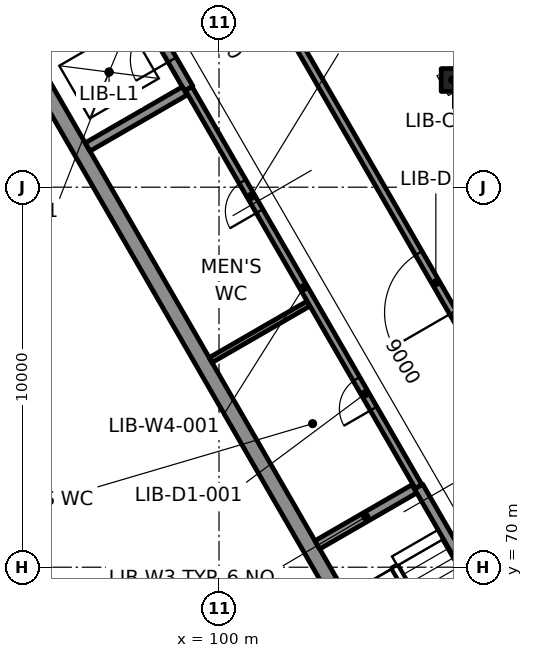
"""IFC4 building model, lengths in metres.
Left out: names, types, materials, properties, quantities, classifications, styles, units other than length and angle.
Written with IfcOpenShell. Run it as: python <this file> out.ifc"""

import sys

from ifc_helpers import new_model, si_unit, direction, frame, frame_2d, origin, origin_2d, place, context, subcontext, project, spatial, rectangle, extrude, element, fill, save


model = new_model("IFC4")
c1 = context("Model", 3, precision=1e-05, world=origin(), true_north=direction((0.0, 1.0)))
c2 = subcontext(c1, "Body", "Model", "MODEL_VIEW")
j1 = project(units=[si_unit("LENGTHUNIT", "METRE"), si_unit("PLANEANGLEUNIT", "RADIAN")], contexts=[c1])
p1 = place(None, origin())
s1 = spatial("IfcSite", under=j1, at=p1, CompositionType="ELEMENT")
p2 = place(p1, origin())
s2 = spatial("IfcBuilding", under=s1, at=p2, CompositionType="ELEMENT")
p3 = place(p2, origin())
s3 = spatial("IfcBuildingStorey", under=s2, at=p3, CompositionType="ELEMENT", Elevation=0.0)
p4 = place(p3, frame((97.021, 76.628, 0.0), z_axis=(0.0, 0.0, 1.0), x_axis=(-0.5, 0.866025403784, 0.0)))
e1 = element("IfcColumn", 1, at=p4, inside=s3, PredefinedType="COLUMN", context=c2, shape_type="SweptSolid", body=[
    extrude(rectangle(XDim=1.2, YDim=1.5, at=origin_2d()), origin(), (0.0, 0.0, 1.0), 8.0),
])
p5 = place(p3, frame((107.504, 60.451, 0.0), z_axis=(0.0, 0.0, 1.0), x_axis=(-0.500000550228, 0.86602508611, 0.0)))
e2 = element("IfcWall", 2, at=p5, inside=s3, PredefinedType="SOLIDWALL", context=c2, shape_type="SweptSolid", body=[
    extrude(rectangle(XDim=57.704, YDim=0.3, at=frame_2d((28.852, 0.0))), origin(), (0.0, 0.0, 1.0), 7.7),
])
p6 = place(p5, frame((56.104, 0.0, 0.0)))
e3 = element("IfcOpeningElement", 3, at=p6, cuts=e2, PredefinedType="OPENING", context=c2, shape_type="SweptSolid", body=[
    extrude(rectangle(XDim=1.2, YDim=2.4, at=frame_2d((0.6, 1.2))), frame((0.0, 0.16, 0.0), z_axis=(0.0, -1.0, 0.0), x_axis=(1.0, 0.0, 0.0)), (0.0, 0.0, 1.0), 0.32),
])
p7 = place(p5, frame((1.552, 0.0, 0.15)))
e4 = element("IfcOpeningElement", 4, at=p7, cuts=e2, PredefinedType="OPENING", context=c2, shape_type="SweptSolid", body=[
    extrude(rectangle(XDim=2.1, YDim=5.4, at=frame_2d((1.05, 2.7))), frame((0.0, 0.16, 0.0), z_axis=(0.0, -1.0, 0.0), x_axis=(1.0, 0.0, 0.0)), (0.0, 0.0, 1.0), 0.32),
])
p8 = place(p5, frame((4.052, 0.0, 0.15)))
e5 = element("IfcOpeningElement", 5, at=p8, cuts=e2, PredefinedType="OPENING", context=c2, shape_type="SweptSolid", body=[
    extrude(rectangle(XDim=2.1, YDim=5.4, at=frame_2d((1.05, 2.7))), frame((0.0, 0.16, 0.0), z_axis=(0.0, -1.0, 0.0), x_axis=(1.0, 0.0, 0.0)), (0.0, 0.0, 1.0), 0.32),
])
p9 = place(p5, frame((6.552, 0.0, 0.15)))
e6 = element("IfcOpeningElement", 6, at=p9, cuts=e2, PredefinedType="OPENING", context=c2, shape_type="SweptSolid", body=[
    extrude(rectangle(XDim=2.1, YDim=5.4, at=frame_2d((1.05, 2.7))), frame((0.0, 0.16, 0.0), z_axis=(0.0, -1.0, 0.0), x_axis=(1.0, 0.0, 0.0)), (0.0, 0.0, 1.0), 0.32),
])
p10 = place(p5, frame((9.052, 0.0, 0.15)))
e7 = element("IfcOpeningElement", 7, at=p10, cuts=e2, PredefinedType="OPENING", context=c2, shape_type="SweptSolid", body=[
    extrude(rectangle(XDim=2.1, YDim=5.4, at=frame_2d((1.05, 2.7))), frame((0.0, 0.16, 0.0), z_axis=(0.0, -1.0, 0.0), x_axis=(1.0, 0.0, 0.0)), (0.0, 0.0, 1.0), 0.32),
])
p11 = place(p5, frame((11.552, 0.0, 0.15)))
e8 = element("IfcOpeningElement", 8, at=p11, cuts=e2, PredefinedType="OPENING", context=c2, shape_type="SweptSolid", body=[
    extrude(rectangle(XDim=2.1, YDim=5.4, at=frame_2d((1.05, 2.7))), frame((0.0, 0.16, 0.0), z_axis=(0.0, -1.0, 0.0), x_axis=(1.0, 0.0, 0.0)), (0.0, 0.0, 1.0), 0.32),
])
p12 = place(p5, frame((14.052, 0.0, 0.15)))
e9 = element("IfcOpeningElement", 9, at=p12, cuts=e2, PredefinedType="OPENING", context=c2, shape_type="SweptSolid", body=[
    extrude(rectangle(XDim=2.1, YDim=5.4, at=frame_2d((1.05, 2.7))), frame((0.0, 0.16, 0.0), z_axis=(0.0, -1.0, 0.0), x_axis=(1.0, 0.0, 0.0)), (0.0, 0.0, 1.0), 0.32),
])
p13 = place(p5, frame((16.552, 0.0, 0.15)))
e10 = element("IfcOpeningElement", 10, at=p13, cuts=e2, PredefinedType="OPENING", context=c2, shape_type="SweptSolid", body=[
    extrude(rectangle(XDim=2.1, YDim=5.4, at=frame_2d((1.05, 2.7))), frame((0.0, 0.16, 0.0), z_axis=(0.0, -1.0, 0.0), x_axis=(1.0, 0.0, 0.0)), (0.0, 0.0, 1.0), 0.32),
])
p14 = place(p5, frame((19.052, 0.0, 0.15)))
e11 = element("IfcOpeningElement", 11, at=p14, cuts=e2, PredefinedType="OPENING", context=c2, shape_type="SweptSolid", body=[
    extrude(rectangle(XDim=2.1, YDim=5.4, at=frame_2d((1.05, 2.7))), frame((0.0, 0.16, 0.0), z_axis=(0.0, -1.0, 0.0), x_axis=(1.0, 0.0, 0.0)), (0.0, 0.0, 1.0), 0.32),
])
p15 = place(p5, frame((21.552, 0.0, 0.15)))
e12 = element("IfcOpeningElement", 12, at=p15, cuts=e2, PredefinedType="OPENING", context=c2, shape_type="SweptSolid", body=[
    extrude(rectangle(XDim=2.1, YDim=5.4, at=frame_2d((1.05, 2.7))), frame((0.0, 0.16, 0.0), z_axis=(0.0, -1.0, 0.0), x_axis=(1.0, 0.0, 0.0)), (0.0, 0.0, 1.0), 0.32),
])
p16 = place(p5, frame((24.052, 0.0, 0.15)))
e13 = element("IfcOpeningElement", 13, at=p16, cuts=e2, PredefinedType="OPENING", context=c2, shape_type="SweptSolid", body=[
    extrude(rectangle(XDim=2.1, YDim=5.4, at=frame_2d((1.05, 2.7))), frame((0.0, 0.16, 0.0), z_axis=(0.0, -1.0, 0.0), x_axis=(1.0, 0.0, 0.0)), (0.0, 0.0, 1.0), 0.32),
])
p17 = place(p5, frame((26.552, 0.0, 0.15)))
e14 = element("IfcOpeningElement", 14, at=p17, cuts=e2, PredefinedType="OPENING", context=c2, shape_type="SweptSolid", body=[
    extrude(rectangle(XDim=2.1, YDim=5.4, at=frame_2d((1.05, 2.7))), frame((0.0, 0.16, 0.0), z_axis=(0.0, -1.0, 0.0), x_axis=(1.0, 0.0, 0.0)), (0.0, 0.0, 1.0), 0.32),
])
p18 = place(p5, frame((29.052, 0.0, 0.15)))
e15 = element("IfcOpeningElement", 15, at=p18, cuts=e2, PredefinedType="OPENING", context=c2, shape_type="SweptSolid", body=[
    extrude(rectangle(XDim=2.1, YDim=5.4, at=frame_2d((1.05, 2.7))), frame((0.0, 0.16, 0.0), z_axis=(0.0, -1.0, 0.0), x_axis=(1.0, 0.0, 0.0)), (0.0, 0.0, 1.0), 0.32),
])
p19 = place(p5, frame((31.552, 0.0, 0.15)))
e16 = element("IfcOpeningElement", 16, at=p19, cuts=e2, PredefinedType="OPENING", context=c2, shape_type="SweptSolid", body=[
    extrude(rectangle(XDim=2.1, YDim=5.4, at=frame_2d((1.05, 2.7))), frame((0.0, 0.16, 0.0), z_axis=(0.0, -1.0, 0.0), x_axis=(1.0, 0.0, 0.0)), (0.0, 0.0, 1.0), 0.32),
])
p20 = place(p5, frame((34.052, 0.0, 0.15)))
e17 = element("IfcOpeningElement", 17, at=p20, cuts=e2, PredefinedType="OPENING", context=c2, shape_type="SweptSolid", body=[
    extrude(rectangle(XDim=2.1, YDim=5.4, at=frame_2d((1.05, 2.7))), frame((0.0, 0.16, 0.0), z_axis=(0.0, -1.0, 0.0), x_axis=(1.0, 0.0, 0.0)), (0.0, 0.0, 1.0), 0.32),
])
p21 = place(p5, frame((36.552, 0.0, 0.15)))
e18 = element("IfcOpeningElement", 18, at=p21, cuts=e2, PredefinedType="OPENING", context=c2, shape_type="SweptSolid", body=[
    extrude(rectangle(XDim=2.1, YDim=5.4, at=frame_2d((1.05, 2.7))), frame((0.0, 0.16, 0.0), z_axis=(0.0, -1.0, 0.0), x_axis=(1.0, 0.0, 0.0)), (0.0, 0.0, 1.0), 0.32),
])
p22 = place(p5, frame((39.052, 0.0, 0.15)))
e19 = element("IfcOpeningElement", 19, at=p22, cuts=e2, PredefinedType="OPENING", context=c2, shape_type="SweptSolid", body=[
    extrude(rectangle(XDim=2.1, YDim=5.4, at=frame_2d((1.05, 2.7))), frame((0.0, 0.16, 0.0), z_axis=(0.0, -1.0, 0.0), x_axis=(1.0, 0.0, 0.0)), (0.0, 0.0, 1.0), 0.32),
])
p23 = place(p5, frame((41.552, 0.0, 0.15)))
e20 = element("IfcOpeningElement", 20, at=p23, cuts=e2, PredefinedType="OPENING", context=c2, shape_type="SweptSolid", body=[
    extrude(rectangle(XDim=2.1, YDim=5.4, at=frame_2d((1.05, 2.7))), frame((0.0, 0.16, 0.0), z_axis=(0.0, -1.0, 0.0), x_axis=(1.0, 0.0, 0.0)), (0.0, 0.0, 1.0), 0.32),
])
p24 = place(p5, frame((44.052, 0.0, 0.15)))
e21 = element("IfcOpeningElement", 21, at=p24, cuts=e2, PredefinedType="OPENING", context=c2, shape_type="SweptSolid", body=[
    extrude(rectangle(XDim=2.1, YDim=5.4, at=frame_2d((1.05, 2.7))), frame((0.0, 0.16, 0.0), z_axis=(0.0, -1.0, 0.0), x_axis=(1.0, 0.0, 0.0)), (0.0, 0.0, 1.0), 0.32),
])
p25 = place(p5, frame((46.552, 0.0, 0.15)))
e22 = element("IfcOpeningElement", 22, at=p25, cuts=e2, PredefinedType="OPENING", context=c2, shape_type="SweptSolid", body=[
    extrude(rectangle(XDim=2.1, YDim=5.4, at=frame_2d((1.05, 2.7))), frame((0.0, 0.16, 0.0), z_axis=(0.0, -1.0, 0.0), x_axis=(1.0, 0.0, 0.0)), (0.0, 0.0, 1.0), 0.32),
])
p26 = place(p5, frame((49.052, 0.0, 0.15)))
e23 = element("IfcOpeningElement", 23, at=p26, cuts=e2, PredefinedType="OPENING", context=c2, shape_type="SweptSolid", body=[
    extrude(rectangle(XDim=2.1, YDim=5.4, at=frame_2d((1.05, 2.7))), frame((0.0, 0.16, 0.0), z_axis=(0.0, -1.0, 0.0), x_axis=(1.0, 0.0, 0.0)), (0.0, 0.0, 1.0), 0.32),
])
p27 = place(p5, frame((51.552, 0.0, 0.15)))
e24 = element("IfcOpeningElement", 24, at=p27, cuts=e2, PredefinedType="OPENING", context=c2, shape_type="SweptSolid", body=[
    extrude(rectangle(XDim=2.1, YDim=5.4, at=frame_2d((1.05, 2.7))), frame((0.0, 0.16, 0.0), z_axis=(0.0, -1.0, 0.0), x_axis=(1.0, 0.0, 0.0)), (0.0, 0.0, 1.0), 0.32),
])
p28 = place(p3, frame((106.147, 82.821, -0.3), z_axis=(0.0, 0.0, 1.0), x_axis=(1.0, 0.0, 0.0)))
e25 = element("IfcColumn", 25, at=p28, inside=s3, PredefinedType="COLUMN", context=c2, shape_type="SweptSolid", body=[
    extrude(rectangle(XDim=0.6, YDim=0.6, at=origin_2d()), origin(), (0.0, 0.0, 1.0), 7.94),
])
p29 = place(p3, frame((107.106, 62.36, 0.0), z_axis=(0.0, 0.0, 1.0), x_axis=(-0.49999992739, 0.866025445706, 0.0)))
e26 = element("IfcWall", 26, at=p29, inside=s3, PredefinedType="SOLIDWALL", context=c2, shape_type="SweptSolid", body=[
    extrude(rectangle(XDim=54.0, YDim=0.4, at=frame_2d((27.0, 0.0))), origin(), (0.0, 0.0, 1.0), 7.64),
])
p30 = place(p3, frame((132.784, 77.185, 0.0), z_axis=(0.0, 0.0, 1.0), x_axis=(-0.49999992739, 0.866025445706, 0.0)))
e27 = element("IfcWall", 27, at=p30, inside=s3, PredefinedType="SOLIDWALL", context=c2, shape_type="SweptSolid", body=[
    extrude(rectangle(XDim=54.0, YDim=0.3, at=frame_2d((27.0, 0.0))), origin(), (0.0, 0.0, 1.0), 7.64),
])
p31 = place(p30, frame((1.6, 0.0, 0.6)))
e28 = element("IfcOpeningElement", 28, at=p31, cuts=e27, PredefinedType="OPENING", context=c2, shape_type="SweptSolid", body=[
    extrude(rectangle(XDim=2.4, YDim=4.6, at=frame_2d((1.2, 2.3))), frame((0.0, 0.16, 0.0), z_axis=(0.0, -1.0, 0.0), x_axis=(1.0, 0.0, 0.0)), (0.0, 0.0, 1.0), 0.32),
])
p32 = place(p30, frame((6.0, 0.0, 0.6)))
e29 = element("IfcOpeningElement", 29, at=p32, cuts=e27, PredefinedType="OPENING", context=c2, shape_type="SweptSolid", body=[
    extrude(rectangle(XDim=2.4, YDim=4.6, at=frame_2d((1.2, 2.3))), frame((0.0, 0.16, 0.0), z_axis=(0.0, -1.0, 0.0), x_axis=(1.0, 0.0, 0.0)), (0.0, 0.0, 1.0), 0.32),
])
p33 = place(p30, frame((10.4, 0.0, 0.6)))
e30 = element("IfcOpeningElement", 30, at=p33, cuts=e27, PredefinedType="OPENING", context=c2, shape_type="SweptSolid", body=[
    extrude(rectangle(XDim=2.4, YDim=4.6, at=frame_2d((1.2, 2.3))), frame((0.0, 0.16, 0.0), z_axis=(0.0, -1.0, 0.0), x_axis=(1.0, 0.0, 0.0)), (0.0, 0.0, 1.0), 0.32),
])
p34 = place(p30, frame((14.8, 0.0, 0.6)))
e31 = element("IfcOpeningElement", 31, at=p34, cuts=e27, PredefinedType="OPENING", context=c2, shape_type="SweptSolid", body=[
    extrude(rectangle(XDim=2.4, YDim=4.6, at=frame_2d((1.2, 2.3))), frame((0.0, 0.16, 0.0), z_axis=(0.0, -1.0, 0.0), x_axis=(1.0, 0.0, 0.0)), (0.0, 0.0, 1.0), 0.32),
])
p35 = place(p30, frame((19.2, 0.0, 0.6)))
e32 = element("IfcOpeningElement", 32, at=p35, cuts=e27, PredefinedType="OPENING", context=c2, shape_type="SweptSolid", body=[
    extrude(rectangle(XDim=2.4, YDim=4.6, at=frame_2d((1.2, 2.3))), frame((0.0, 0.16, 0.0), z_axis=(0.0, -1.0, 0.0), x_axis=(1.0, 0.0, 0.0)), (0.0, 0.0, 1.0), 0.32),
])
p36 = place(p30, frame((23.6, 0.0, 0.6)))
e33 = element("IfcOpeningElement", 33, at=p36, cuts=e27, PredefinedType="OPENING", context=c2, shape_type="SweptSolid", body=[
    extrude(rectangle(XDim=2.4, YDim=4.6, at=frame_2d((1.2, 2.3))), frame((0.0, 0.16, 0.0), z_axis=(0.0, -1.0, 0.0), x_axis=(1.0, 0.0, 0.0)), (0.0, 0.0, 1.0), 0.32),
])
p37 = place(p30, frame((28.0, 0.0, 0.6)))
e34 = element("IfcOpeningElement", 34, at=p37, cuts=e27, PredefinedType="OPENING", context=c2, shape_type="SweptSolid", body=[
    extrude(rectangle(XDim=2.4, YDim=4.6, at=frame_2d((1.2, 2.3))), frame((0.0, 0.16, 0.0), z_axis=(0.0, -1.0, 0.0), x_axis=(1.0, 0.0, 0.0)), (0.0, 0.0, 1.0), 0.32),
])
p38 = place(p30, frame((32.4, 0.0, 0.6)))
e35 = element("IfcOpeningElement", 35, at=p38, cuts=e27, PredefinedType="OPENING", context=c2, shape_type="SweptSolid", body=[
    extrude(rectangle(XDim=2.4, YDim=4.6, at=frame_2d((1.2, 2.3))), frame((0.0, 0.16, 0.0), z_axis=(0.0, -1.0, 0.0), x_axis=(1.0, 0.0, 0.0)), (0.0, 0.0, 1.0), 0.32),
])
p39 = place(p30, frame((36.8, 0.0, 0.6)))
e36 = element("IfcOpeningElement", 36, at=p39, cuts=e27, PredefinedType="OPENING", context=c2, shape_type="SweptSolid", body=[
    extrude(rectangle(XDim=2.4, YDim=4.6, at=frame_2d((1.2, 2.3))), frame((0.0, 0.16, 0.0), z_axis=(0.0, -1.0, 0.0), x_axis=(1.0, 0.0, 0.0)), (0.0, 0.0, 1.0), 0.32),
])
p40 = place(p30, frame((46.35, 0.0, 0.0)))
e37 = element("IfcOpeningElement", 37, at=p40, cuts=e27, PredefinedType="OPENING", context=c2, shape_type="SweptSolid", body=[
    extrude(rectangle(XDim=1.2, YDim=2.2, at=frame_2d((0.6, 1.1))), frame((0.0, 0.16, 0.0), z_axis=(0.0, -1.0, 0.0), x_axis=(1.0, 0.0, 0.0)), (0.0, 0.0, 1.0), 0.32),
])
p41 = place(p3, frame((102.587, 70.587, 0.0), z_axis=(0.0, 0.0, 1.0), x_axis=(0.866039495442, 0.49997559174, 0.0)))
e38 = element("IfcWall", 38, at=p41, inside=s3, PredefinedType="SOLIDWALL", context=c2, shape_type="SweptSolid", body=[
    extrude(rectangle(XDim=2.95, YDim=0.25, at=frame_2d((1.475, 0.0))), origin(), (0.0, 0.0, 1.0), 7.64),
])
p42 = place(p3, frame((109.792, 64.257, 0.0), z_axis=(0.0, 0.0, 1.0), x_axis=(-0.499994616197, 0.866028512102, 0.0)))
e39 = element("IfcWall", 39, at=p42, inside=s3, PredefinedType="SOLIDWALL", context=c2, shape_type="SweptSolid", body=[
    extrude(rectangle(XDim=9.085, YDim=0.25, at=frame_2d((4.542, 0.0))), origin(), (0.0, 0.0, 1.0), 7.64),
])
p43 = place(p42, frame((0.2, 0.0, 0.0)))
e40 = element("IfcOpeningElement", 40, at=p43, cuts=e39, PredefinedType="OPENING", context=c2, shape_type="SweptSolid", body=[
    extrude(rectangle(XDim=1.0, YDim=2.1, at=frame_2d((0.5, 1.05))), frame((0.0, 0.135, 0.0), z_axis=(0.0, -1.0, 0.0), x_axis=(1.0, 0.0, 0.0)), (0.0, 0.0, 1.0), 0.27),
])
p44 = place(p3, frame((99.205, 82.595, 0.0), z_axis=(0.0, 0.0, 1.0), x_axis=(-0.500011643316, 0.866018681408, 0.0)))
e41 = element("IfcWall", 41, at=p44, inside=s3, PredefinedType="SOLIDWALL", context=c2, shape_type="SweptSolid", body=[
    extrude(rectangle(XDim=8.55, YDim=0.25, at=frame_2d((4.275, 0.0))), origin(), (0.0, 0.0, 1.0), 7.64),
])
p45 = place(p44, frame((0.875, 0.0, 0.0)))
e42 = element("IfcOpeningElement", 42, at=p45, cuts=e41, PredefinedType="OPENING", context=c2, shape_type="SweptSolid", body=[
    extrude(rectangle(XDim=1.1, YDim=2.1, at=frame_2d((0.55, 1.05))), frame((0.0, 0.135, 0.0), z_axis=(0.0, -1.0, 0.0), x_axis=(1.0, 0.0, 0.0)), (0.0, 0.0, 1.0), 0.27),
])
p46 = place(p44, frame((3.725, 0.0, 0.0)))
e43 = element("IfcOpeningElement", 43, at=p46, cuts=e41, PredefinedType="OPENING", context=c2, shape_type="SweptSolid", body=[
    extrude(rectangle(XDim=1.1, YDim=2.1, at=frame_2d((0.55, 1.05))), frame((0.0, 0.135, 0.0), z_axis=(0.0, -1.0, 0.0), x_axis=(1.0, 0.0, 0.0)), (0.0, 0.0, 1.0), 0.27),
])
p47 = place(p44, frame((6.575, 0.0, 0.0)))
e44 = element("IfcOpeningElement", 44, at=p47, cuts=e41, PredefinedType="OPENING", context=c2, shape_type="SweptSolid", body=[
    extrude(rectangle(XDim=1.1, YDim=2.1, at=frame_2d((0.55, 1.05))), frame((0.0, 0.135, 0.0), z_axis=(0.0, -1.0, 0.0), x_axis=(1.0, 0.0, 0.0)), (0.0, 0.0, 1.0), 0.27),
])
p48 = place(p3, frame((99.779, 75.45, 0.0), z_axis=(0.0, 0.0, 1.0), x_axis=(0.866017493347, 0.500013701029, 0.0)))
e45 = element("IfcWall", 45, at=p48, inside=s3, PredefinedType="PARTITIONING", context=c2, shape_type="SweptSolid", body=[
    extrude(rectangle(XDim=2.975, YDim=0.15, at=frame_2d((1.488, 0.0))), origin(), (0.0, 0.0, 1.0), 7.64),
])
p49 = place(p3, frame((105.25, 72.125, 0.0), z_axis=(0.0, 0.0, 1.0), x_axis=(-0.499996309931, 0.866027534236, 0.0)))
e46 = element("IfcWall", 46, at=p49, inside=s3, PredefinedType="PARTITIONING", context=c2, shape_type="SweptSolid", body=[
    extrude(rectangle(XDim=12.09, YDim=0.2, at=frame_2d((6.045, 0.0))), origin(), (0.0, 0.0, 1.0), 7.64),
])
p50 = place(p49, frame((2.365, 0.0, 0.0)))
e47 = element("IfcOpeningElement", 47, at=p50, cuts=e46, PredefinedType="OPENING", context=c2, shape_type="SweptSolid", body=[
    extrude(rectangle(XDim=0.9, YDim=2.1, at=frame_2d((0.45, 1.05))), frame((0.0, 0.11, 0.0), z_axis=(0.0, -1.0, 0.0), x_axis=(1.0, 0.0, 0.0)), (0.0, 0.0, 1.0), 0.22),
])
p51 = place(p49, frame((8.365, 0.0, 0.0)))
e48 = element("IfcOpeningElement", 48, at=p51, cuts=e46, PredefinedType="OPENING", context=c2, shape_type="SweptSolid", body=[
    extrude(rectangle(XDim=0.9, YDim=2.1, at=frame_2d((0.45, 1.05))), frame((0.0, 0.11, 0.0), z_axis=(0.0, -1.0, 0.0), x_axis=(1.0, 0.0, 0.0)), (0.0, 0.0, 1.0), 0.22),
])
for number, where, z_axis, x_axis in (
    (49, (96.542, 81.058, 0.0), (0.0, 0.0, 1.0), (0.866, 0.5, 0.0)),
    (50, (95.117, 83.526, 0.0), (0.0, 0.0, 1.0), (0.866, 0.5, 0.0)),
):
    element("IfcWall", number, at=place(p3, frame(where, z_axis=z_axis, x_axis=x_axis)), inside=s3, PredefinedType="SOLIDWALL", context=c2, shape_type="SweptSolid", body=[
        extrude(rectangle(XDim=2.95, YDim=0.25, at=frame_2d((1.475, 0.0))), origin(), (0.0, 0.0, 1.0), 7.64),
    ])
p52 = place(p3, frame((112.456, 65.794, 0.0), z_axis=(0.0, 0.0, 1.0), x_axis=(-0.499998559706, 0.866026235337, 0.0)))
e51 = element("IfcWall", 51, at=p52, inside=s3, PredefinedType="PARTITIONING", context=c2, shape_type="SweptSolid", body=[
    extrude(rectangle(XDim=53.4, YDim=0.2, at=frame_2d((26.7, 0.0))), origin(), (0.0, 0.0, 1.0), 7.64),
])
p53 = place(p52, frame((12.6, 0.0, 0.0)))
e52 = element("IfcOpeningElement", 52, at=p53, cuts=e51, PredefinedType="OPENING", context=c2, shape_type="SweptSolid", body=[
    extrude(rectangle(XDim=1.8, YDim=2.1, at=frame_2d((0.9, 1.05))), frame((0.0, 0.11, 0.0), z_axis=(0.0, -1.0, 0.0), x_axis=(1.0, 0.0, 0.0)), (0.0, 0.0, 1.0), 0.22),
])
p54 = place(p52, frame((25.8, 0.0, 0.0)))
e53 = element("IfcOpeningElement", 53, at=p54, cuts=e51, PredefinedType="OPENING", context=c2, shape_type="SweptSolid", body=[
    extrude(rectangle(XDim=1.8, YDim=2.1, at=frame_2d((0.9, 1.05))), frame((0.0, 0.11, 0.0), z_axis=(0.0, -1.0, 0.0), x_axis=(1.0, 0.0, 0.0)), (0.0, 0.0, 1.0), 0.22),
])
p55 = place(p52, frame((35.0, 0.0, 0.0)))
e54 = element("IfcOpeningElement", 54, at=p55, cuts=e51, PredefinedType="OPENING", context=c2, shape_type="SweptSolid", body=[
    extrude(rectangle(XDim=1.0, YDim=2.1, at=frame_2d((0.5, 1.05))), frame((0.0, 0.11, 0.0), z_axis=(0.0, -1.0, 0.0), x_axis=(1.0, 0.0, 0.0)), (0.0, 0.0, 1.0), 0.22),
])
p56 = place(p52, frame((45.75, 0.0, 0.0)))
e55 = element("IfcOpeningElement", 55, at=p56, cuts=e51, PredefinedType="OPENING", context=c2, shape_type="SweptSolid", body=[
    extrude(rectangle(XDim=1.8, YDim=2.1, at=frame_2d((0.9, 1.05))), frame((0.0, 0.11, 0.0), z_axis=(0.0, -1.0, 0.0), x_axis=(1.0, 0.0, 0.0)), (0.0, 0.0, 1.0), 0.22),
])
p57 = place(p10, origin())
e56 = element("IfcWindow", 56, at=p57, inside=s3, PartitioningType="SINGLE_PANEL", PredefinedType="WINDOW", context=c2, shape_type="SweptSolid", body=[
    extrude(rectangle(XDim=2.1, YDim=5.4, at=frame_2d((1.05, 2.7))), frame((0.0, 0.03, 0.0), z_axis=(0.0, -1.0, 0.0), x_axis=(1.0, 0.0, 0.0)), (0.0, 0.0, 1.0), 0.06),
])
fill(e7, e56)
p58 = place(p11, origin())
e57 = element("IfcWindow", 57, at=p58, inside=s3, PartitioningType="SINGLE_PANEL", PredefinedType="WINDOW", context=c2, shape_type="SweptSolid", body=[
    extrude(rectangle(XDim=2.1, YDim=5.4, at=frame_2d((1.05, 2.7))), frame((0.0, 0.03, 0.0), z_axis=(0.0, -1.0, 0.0), x_axis=(1.0, 0.0, 0.0)), (0.0, 0.0, 1.0), 0.06),
])
fill(e8, e57)
p59 = place(p12, origin())
e58 = element("IfcWindow", 58, at=p59, inside=s3, PartitioningType="SINGLE_PANEL", PredefinedType="WINDOW", context=c2, shape_type="SweptSolid", body=[
    extrude(rectangle(XDim=2.1, YDim=5.4, at=frame_2d((1.05, 2.7))), frame((0.0, 0.03, 0.0), z_axis=(0.0, -1.0, 0.0), x_axis=(1.0, 0.0, 0.0)), (0.0, 0.0, 1.0), 0.06),
])
fill(e9, e58)
p60 = place(p13, origin())
e59 = element("IfcWindow", 59, at=p60, inside=s3, PartitioningType="SINGLE_PANEL", PredefinedType="WINDOW", context=c2, shape_type="SweptSolid", body=[
    extrude(rectangle(XDim=2.1, YDim=5.4, at=frame_2d((1.05, 2.7))), frame((0.0, 0.03, 0.0), z_axis=(0.0, -1.0, 0.0), x_axis=(1.0, 0.0, 0.0)), (0.0, 0.0, 1.0), 0.06),
])
fill(e10, e59)
p61 = place(p14, origin())
e60 = element("IfcWindow", 60, at=p61, inside=s3, PartitioningType="SINGLE_PANEL", PredefinedType="WINDOW", context=c2, shape_type="SweptSolid", body=[
    extrude(rectangle(XDim=2.1, YDim=5.4, at=frame_2d((1.05, 2.7))), frame((0.0, 0.03, 0.0), z_axis=(0.0, -1.0, 0.0), x_axis=(1.0, 0.0, 0.0)), (0.0, 0.0, 1.0), 0.06),
])
fill(e11, e60)
p62 = place(p15, origin())
e61 = element("IfcWindow", 61, at=p62, inside=s3, PartitioningType="SINGLE_PANEL", PredefinedType="WINDOW", context=c2, shape_type="SweptSolid", body=[
    extrude(rectangle(XDim=2.1, YDim=5.4, at=frame_2d((1.05, 2.7))), frame((0.0, 0.03, 0.0), z_axis=(0.0, -1.0, 0.0), x_axis=(1.0, 0.0, 0.0)), (0.0, 0.0, 1.0), 0.06),
])
fill(e12, e61)
p63 = place(p50, origin())
e62 = element("IfcDoor", 62, at=p63, inside=s3, OperationType="SINGLE_SWING_LEFT", PredefinedType="DOOR", context=c2, shape_type="SweptSolid", body=[
    extrude(rectangle(XDim=0.9, YDim=2.1, at=frame_2d((0.45, 1.05))), frame((0.0, 0.025, 0.0), z_axis=(0.0, -1.0, 0.0), x_axis=(1.0, 0.0, 0.0)), (0.0, 0.0, 1.0), 0.05),
])
fill(e47, e62)
p64 = place(p51, origin())
e63 = element("IfcDoor", 63, at=p64, inside=s3, OperationType="SINGLE_SWING_RIGHT", PredefinedType="DOOR", context=c2, shape_type="SweptSolid", body=[
    extrude(rectangle(XDim=0.9, YDim=2.1, at=frame_2d((0.45, 1.05))), frame((0.0, 0.025, 0.0), z_axis=(0.0, -1.0, 0.0), x_axis=(1.0, 0.0, 0.0)), (0.0, 0.0, 1.0), 0.05),
])
fill(e48, e63)
p65 = place(p45, origin())
e64 = element("IfcDoor", 64, at=p65, inside=s3, OperationType="DOUBLE_DOOR_SLIDING", PredefinedType="DOOR", context=c2, shape_type="SweptSolid", body=[
    extrude(rectangle(XDim=1.1, YDim=2.1, at=frame_2d((0.55, 1.05))), frame((0.0, 0.025, 0.0), z_axis=(0.0, -1.0, 0.0), x_axis=(1.0, 0.0, 0.0)), (0.0, 0.0, 1.0), 0.05),
])
fill(e42, e64)
p66 = place(p53, origin())
e65 = element("IfcDoor", 65, at=p66, inside=s3, OperationType="DOUBLE_DOOR_SINGLE_SWING", PredefinedType="DOOR", context=c2, shape_type="SweptSolid", body=[
    extrude(rectangle(XDim=1.8, YDim=2.1, at=frame_2d((0.9, 1.05))), frame((0.0, 0.025, 0.0), z_axis=(0.0, -1.0, 0.0), x_axis=(1.0, 0.0, 0.0)), (0.0, 0.0, 1.0), 0.05),
])
fill(e52, e65)
save(model, sys.argv[1])
